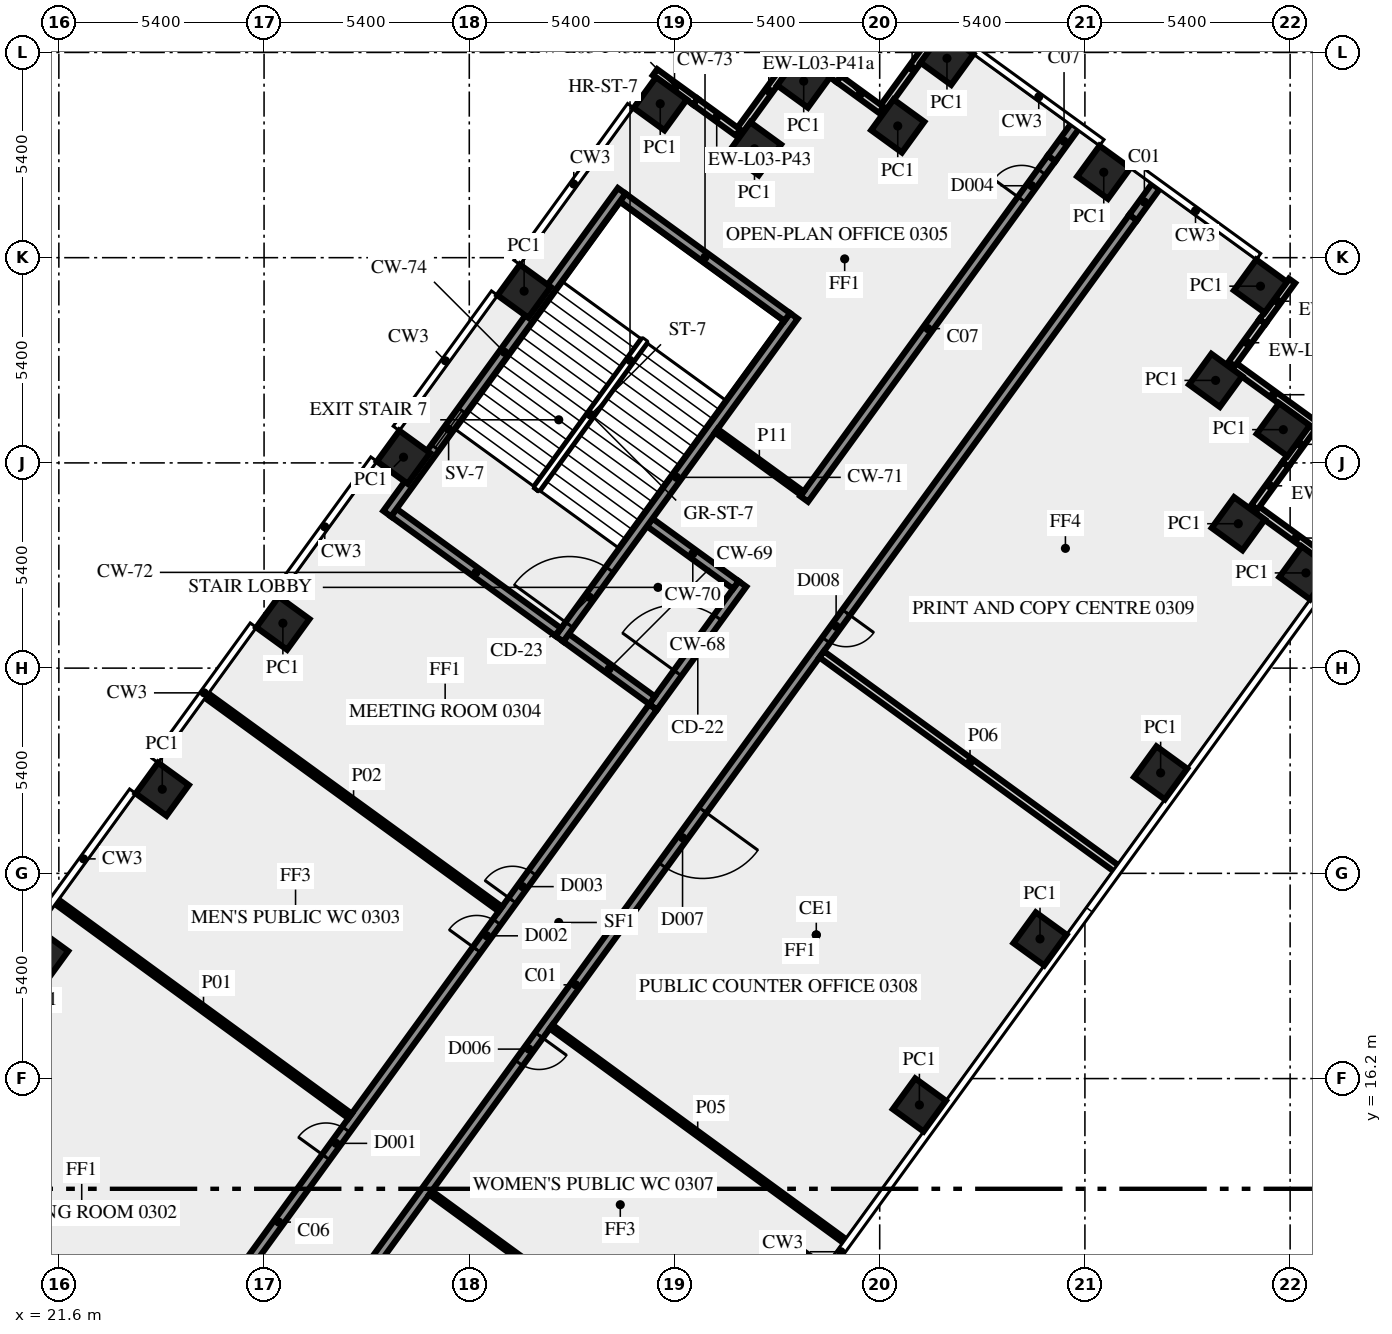
"""IFC4 building model, lengths in metres.
Left out: names, types, materials, properties, quantities, classifications, styles, units other than length and angle.
Written with IfcOpenShell. Run it as: python <this file> out.ifc"""

import sys

from ifc_helpers import new_model, si_unit, direction, frame, frame_2d, origin, origin_2d, place, context, subcontext, project, spatial, rectangle, extrude, element, fill, save


model = new_model("IFC4")
c1 = context("Model", 3, precision=1e-05, world=origin(), true_north=direction((0.0, 1.0)))
c2 = subcontext(c1, "Body", "Model", "MODEL_VIEW")
j1 = project(units=[si_unit("LENGTHUNIT", "METRE"), si_unit("PLANEANGLEUNIT", "RADIAN")], contexts=[c1])
p1 = place(None, origin())
s1 = spatial("IfcSite", under=j1, at=p1, CompositionType="ELEMENT")
p2 = place(p1, origin())
s2 = spatial("IfcBuilding", under=s1, at=p2, CompositionType="ELEMENT")
p3 = place(p2, frame((0.0, 0.0, 16.0)))
s3 = spatial("IfcBuildingStorey", under=s2, at=p3, CompositionType="ELEMENT", Elevation=16.0)
for number, where, z_axis, x_axis in (
    (1, (41.07, 11.137, 0.0), (0.0, 0.0, 1.0), (0.588, 0.809, 0.0)),
    (2, (44.244, 15.506, 0.0), (0.0, 0.0, 1.0), (0.588, 0.809, 0.0)),
    (3, (47.418, 19.875, 0.0), (0.0, 0.0, 1.0), (0.588, 0.809, 0.0)),
    (4, (50.592, 24.243, 0.0), (0.0, 0.0, 1.0), (0.588, 0.809, 0.0)),
    (5, (54.415, 29.505, 0.0), (0.0, 0.0, 1.0), (0.588, 0.809, 0.0)),
    (6, (52.636, 30.8, 0.0), (0.0, 0.0, 1.0), (-0.809, 0.588, 0.0)),
    (7, (53.82, 33.275, 0.0), (0.0, 0.0, 1.0), (-0.809, 0.588, 0.0)),
    (8, (52.039, 34.571, 0.0), (0.0, 0.0, 1.0), (0.588, 0.809, 0.0)),
    (9, (53.22, 37.05, 0.0), (0.0, 0.0, 1.0), (-0.809, 0.588, 0.0)),
    (10, (49.096, 40.047, 0.0), (0.0, 0.0, 1.0), (-0.809, 0.588, 0.0)),
    (11, (44.97, 43.045, 0.0), (0.0, 0.0, 1.0), (-0.809, 0.588, 0.0)),
    (12, (43.675, 41.265, 0.0), (0.0, 0.0, 1.0), (-0.809, 0.588, 0.0)),
    (13, (41.2, 42.445, 0.0), (0.0, 0.0, 1.0), (-0.588, -0.809, 0.0)),
    (14, (39.906, 40.666, 0.0), (0.0, 0.0, 1.0), (-0.588, -0.809, 0.0)),
    (15, (37.425, 41.85, 0.0), (0.0, 0.0, 1.0), (-0.588, -0.809, 0.0)),
    (16, (33.843, 36.919, 0.0), (0.0, 0.0, 1.0), (-0.588, -0.809, 0.0)),
    (17, (30.669, 32.55, 0.0), (0.0, 0.0, 1.0), (-0.588, -0.809, 0.0)),
    (18, (27.495, 28.181, 0.0), (0.0, 0.0, 1.0), (-0.588, -0.809, 0.0)),
    (19, (24.321, 23.812, 0.0), (0.0, 0.0, 1.0), (-0.588, -0.809, 0.0)),
    (20, (21.147, 19.444, 0.0), (0.0, 0.0, 1.0), (-0.588, -0.809, 0.0)),
):
    element("IfcColumn", number, at=place(p3, frame(where, z_axis=z_axis, x_axis=x_axis)), inside=s3, PredefinedType="COLUMN", context=c2, shape_type="SweptSolid", body=[
        extrude(rectangle(XDim=1.0, YDim=1.0, at=origin_2d()), origin(), (0.0, 0.0, 1.0), 4.1),
    ])
p4 = place(p3, frame((55.247, 29.629, 0.0), z_axis=(0.0, 0.0, 1.0), x_axis=(-0.809033161865, 0.587762999008, 0.0)))
e21 = element("IfcWall", 21, at=p4, inside=s3, PredefinedType="SOLIDWALL", context=c2, shape_type="SweptSolid", body=[
    extrude(rectangle(XDim=2.7, YDim=0.2, at=frame_2d((1.35, 0.0))), origin(), (0.0, 0.0, 1.0), 4.1),
])
p5 = place(p3, frame((53.06, 31.233, 0.0), z_axis=(0.0, 0.0, 1.0), x_axis=(0.587776137069, 0.809023616894, 0.0)))
e22 = element("IfcWall", 22, at=p5, inside=s3, PredefinedType="SOLIDWALL", context=c2, shape_type="SweptSolid", body=[
    extrude(rectangle(XDim=1.395, YDim=0.2, at=frame_2d((0.697, 0.0))), origin(), (0.0, 0.0, 1.0), 3.1),
])
p6 = place(p3, frame((53.88, 32.361, 0.0), z_axis=(0.0, 0.0, 1.0), x_axis=(0.587871379726, 0.808954412127, 0.0)))
e23 = element("IfcWall", 23, at=p6, inside=s3, PredefinedType="SOLIDWALL", context=c2, shape_type="SweptSolid", body=[
    extrude(rectangle(XDim=1.305, YDim=0.2, at=frame_2d((0.653, 0.0))), origin(), (0.0, 0.0, 1.0), 4.1),
])
p7 = place(p3, frame((54.65, 33.4, 0.0), z_axis=(0.0, 0.0, 1.0), x_axis=(-0.809033161865, 0.587762999008, 0.0)))
e24 = element("IfcWall", 24, at=p7, inside=s3, PredefinedType="SOLIDWALL", context=c2, shape_type="SweptSolid", body=[
    extrude(rectangle(XDim=2.7, YDim=0.2, at=frame_2d((1.35, 0.0))), origin(), (0.0, 0.0, 1.0), 4.1),
])
p8 = place(p3, frame((52.463, 35.004, 0.0), z_axis=(0.0, 0.0, 1.0), x_axis=(0.587782252522, 0.809019173827, 0.0)))
e25 = element("IfcWall", 25, at=p8, inside=s3, PredefinedType="SOLIDWALL", context=c2, shape_type="SweptSolid", body=[
    extrude(rectangle(XDim=1.379, YDim=0.2, at=frame_2d((0.69, 0.0))), origin(), (0.0, 0.0, 1.0), 3.1),
])
p9 = place(p3, frame((53.273, 36.12, 0.0), z_axis=(0.0, 0.0, 1.0), x_axis=(0.58786388341, 0.808959859686, 0.0)))
e26 = element("IfcWall", 26, at=p9, inside=s3, PredefinedType="SOLIDWALL", context=c2, shape_type="SweptSolid", body=[
    extrude(rectangle(XDim=1.321, YDim=0.2, at=frame_2d((0.66, 0.0))), origin(), (0.0, 0.0, 1.0), 4.1),
])
p10 = place(p3, frame((44.846, 43.875, 0.0), z_axis=(0.0, 0.0, 1.0), x_axis=(-0.587822180636, -0.808990163075, 0.0)))
e27 = element("IfcWall", 27, at=p10, inside=s3, PredefinedType="SOLIDWALL", context=c2, shape_type="SweptSolid", body=[
    extrude(rectangle(XDim=2.7, YDim=0.2, at=frame_2d((1.35, 0.0))), origin(), (0.0, 0.0, 1.0), 4.1),
])
p11 = place(p3, frame((43.242, 41.688, 0.0), z_axis=(0.0, 0.0, 1.0), x_axis=(-0.808926734208, 0.5879094647, 0.0)))
e28 = element("IfcWall", 28, at=p11, inside=s3, PredefinedType="SOLIDWALL", context=c2, shape_type="SweptSolid", body=[
    extrude(rectangle(XDim=1.384, YDim=0.2, at=frame_2d((0.692, 0.0))), origin(), (0.0, 0.0, 1.0), 3.1),
])
p12 = place(p3, frame((42.123, 42.502, 0.0), z_axis=(0.0, 0.0, 1.0), x_axis=(-0.809056865039, 0.587730371117, 0.0)))
e29 = element("IfcWall", 29, at=p12, inside=s3, PredefinedType="SOLIDWALL", context=c2, shape_type="SweptSolid", body=[
    extrude(rectangle(XDim=1.316, YDim=0.2, at=frame_2d((0.658, 0.0))), origin(), (0.0, 0.0, 1.0), 4.1),
])
p13 = place(p3, frame((41.075, 43.278, 0.0), z_axis=(0.0, 0.0, 1.0), x_axis=(-0.587806000234, -0.809001919707, 0.0)))
e30 = element("IfcWall", 30, at=p13, inside=s3, PredefinedType="SOLIDWALL", context=c2, shape_type="SweptSolid", body=[
    extrude(rectangle(XDim=2.7, YDim=0.2, at=frame_2d((1.35, 0.0))), origin(), (0.0, 0.0, 1.0), 4.1),
])
p14 = place(p3, frame((39.471, 41.091, 0.0), z_axis=(0.0, 0.0, 1.0), x_axis=(-0.809002762913, 0.58780483972, 0.0)))
e31 = element("IfcWall", 31, at=p14, inside=s3, PredefinedType="SOLIDWALL", context=c2, shape_type="SweptSolid", body=[
    extrude(rectangle(XDim=1.385, YDim=0.2, at=frame_2d((0.693, 0.0))), origin(), (0.0, 0.0, 1.0), 3.1),
])
p15 = place(p3, frame((38.351, 41.905, 0.0), z_axis=(0.0, 0.0, 1.0), x_axis=(-0.809065186597, 0.587718915671, 0.0)))
e32 = element("IfcWall", 32, at=p15, inside=s3, PredefinedType="SOLIDWALL", context=c2, shape_type="SweptSolid", body=[
    extrude(rectangle(XDim=1.315, YDim=0.2, at=frame_2d((0.657, 0.0))), origin(), (0.0, 0.0, 1.0), 4.1),
])
p16 = place(p3, frame((37.238, 25.98, 0.0), z_axis=(0.0, 0.0, 1.0), x_axis=(0.587772420479, 0.809026317077, 0.0)))
e33 = element("IfcWall", 33, at=p16, inside=s3, PredefinedType="SHEAR", context=c2, shape_type="SweptSolid", body=[
    extrude(rectangle(XDim=4.0, YDim=0.25, at=frame_2d((2.0, 0.0))), origin(), (0.0, 0.0, 1.0), 4.1),
])
p17 = place(p16, frame((1.1, 0.0, 0.0)))
e34 = element("IfcOpeningElement", 34, at=p17, cuts=e33, PredefinedType="OPENING", context=c2, shape_type="SweptSolid", body=[
    extrude(rectangle(XDim=1.8, YDim=2.1, at=frame_2d((0.9, 1.05))), frame((0.0, 0.135, 0.0), z_axis=(0.0, -1.0, 0.0), x_axis=(1.0, 0.0, 0.0)), (0.0, 0.0, 1.0), 0.27),
])
for number, where, z_axis, x_axis in (
    (35, (37.21, 26.154, 0.0), (0.0, 0.0, 1.0), (-0.809, 0.588, 0.0)),
    (36, (39.414, 29.188, 0.0), (0.0, 0.0, 1.0), (-0.809, 0.588, 0.0)),
):
    element("IfcWall", number, at=place(p3, frame(where, z_axis=z_axis, x_axis=x_axis)), inside=s3, PredefinedType="SHEAR", context=c2, shape_type="SweptSolid", body=[
        extrude(rectangle(XDim=2.8, YDim=0.25, at=frame_2d((1.4, 0.0))), origin(), (0.0, 0.0, 1.0), 4.1),
    ])
p18 = place(p3, frame((34.77, 27.772, 0.0), z_axis=(0.0, 0.0, 1.0), x_axis=(0.587795589702, 0.809009483706, 0.0)))
e37 = element("IfcWall", 37, at=p18, inside=s3, PredefinedType="SHEAR", context=c2, shape_type="SweptSolid", body=[
    extrude(rectangle(XDim=10.5, YDim=0.25, at=frame_2d((5.25, 0.0))), origin(), (0.0, 0.0, 1.0), 4.1),
])
p19 = place(p18, frame((0.45, 0.0, 0.0)))
e38 = element("IfcOpeningElement", 38, at=p19, cuts=e37, PredefinedType="OPENING", context=c2, shape_type="SweptSolid", body=[
    extrude(rectangle(XDim=1.8, YDim=2.1, at=frame_2d((0.9, 1.05))), frame((0.0, 0.135, 0.0), z_axis=(0.0, -1.0, 0.0), x_axis=(1.0, 0.0, 0.0)), (0.0, 0.0, 1.0), 0.27),
])
p20 = place(p3, frame((34.742, 27.947, 0.0), z_axis=(0.0, 0.0, 1.0), x_axis=(-0.8089984606, 0.587810760999, 0.0)))
e39 = element("IfcWall", 39, at=p20, inside=s3, PredefinedType="SHEAR", context=c2, shape_type="SweptSolid", body=[
    extrude(rectangle(XDim=5.35, YDim=0.25, at=frame_2d((2.675, 0.0))), origin(), (0.0, 0.0, 1.0), 4.1),
])
p21 = place(p3, frame((40.767, 36.24, 0.0), z_axis=(0.0, 0.0, 1.0), x_axis=(-0.809020161303, 0.587780893365, 0.0)))
e40 = element("IfcWall", 40, at=p21, inside=s3, PredefinedType="SHEAR", context=c2, shape_type="SweptSolid", body=[
    extrude(rectangle(XDim=5.35, YDim=0.25, at=frame_2d((2.675, 0.0))), origin(), (0.0, 0.0, 1.0), 4.1),
])
p22 = place(p3, frame((30.24, 31.064, 0.0), z_axis=(0.0, 0.0, 1.0), x_axis=(0.587795589702, 0.809009483706, 0.0)))
e41 = element("IfcWall", 41, at=p22, inside=s3, PredefinedType="SHEAR", context=c2, shape_type="SweptSolid", body=[
    extrude(rectangle(XDim=10.5, YDim=0.25, at=frame_2d((5.25, 0.0))), origin(), (0.0, 0.0, 1.0), 4.1),
])
p23 = place(p22, frame((2.15, 0.0, 1.0)))
e42 = element("IfcOpeningElement", 42, at=p23, cuts=e41, PredefinedType="OPENING", context=c2, shape_type="SweptSolid", body=[
    extrude(rectangle(XDim=1.2, YDim=1.2, at=frame_2d((0.6, 0.6))), frame((0.0, 0.135, 0.0), z_axis=(0.0, -1.0, 0.0), x_axis=(1.0, 0.0, 0.0)), (0.0, 0.0, 1.0), 0.27),
])
p24 = place(p3, frame((49.869, 38.856, 0.0), z_axis=(0.0, 0.0, 1.0), x_axis=(-0.587784522481, -0.809017524614, 0.0)))
e43 = element("IfcWall", 43, at=p24, inside=s3, PredefinedType="SOLIDWALL", context=c2, shape_type="SweptSolid", body=[
    extrude(rectangle(XDim=49.912, YDim=0.25, at=frame_2d((24.956, 0.0))), origin(), (0.0, 0.0, 1.0), 4.1),
])
p25 = place(p24, frame((19.271, 0.0, 0.0)))
e44 = element("IfcOpeningElement", 44, at=p25, cuts=e43, PredefinedType="OPENING", context=c2, shape_type="SweptSolid", body=[
    extrude(rectangle(XDim=1.8, YDim=2.1, at=frame_2d((0.9, 1.05))), frame((0.0, 0.135, 0.0), z_axis=(0.0, -1.0, 0.0), x_axis=(1.0, 0.0, 0.0)), (0.0, 0.0, 1.0), 0.27),
])
p26 = place(p24, frame((26.596, 0.0, 0.0)))
e45 = element("IfcOpeningElement", 45, at=p26, cuts=e43, PredefinedType="OPENING", context=c2, shape_type="SweptSolid", body=[
    extrude(rectangle(XDim=0.9, YDim=2.1, at=frame_2d((0.45, 1.05))), frame((0.0, 0.135, 0.0), z_axis=(0.0, -1.0, 0.0), x_axis=(1.0, 0.0, 0.0)), (0.0, 0.0, 1.0), 0.27),
])
p27 = place(p24, frame((12.846, 0.0, 0.0)))
e46 = element("IfcOpeningElement", 46, at=p27, cuts=e43, PredefinedType="OPENING", context=c2, shape_type="SweptSolid", body=[
    extrude(rectangle(XDim=0.9, YDim=2.1, at=frame_2d((0.45, 1.05))), frame((0.0, 0.135, 0.0), z_axis=(0.0, -1.0, 0.0), x_axis=(1.0, 0.0, 0.0)), (0.0, 0.0, 1.0), 0.27),
])
p28 = place(p24, frame((39.788, 0.0, 0.0)))
e47 = element("IfcOpeningElement", 47, at=p28, cuts=e43, PredefinedType="OPENING", context=c2, shape_type="SweptSolid", body=[
    extrude(rectangle(XDim=1.8, YDim=2.1, at=frame_2d((0.9, 1.05))), frame((0.0, 0.135, 0.0), z_axis=(0.0, -1.0, 0.0), x_axis=(1.0, 0.0, 0.0)), (0.0, 0.0, 1.0), 0.27),
])
p29 = place(p3, frame((17.545, -1.125, 0.0), z_axis=(0.0, 0.0, 1.0), x_axis=(0.587786323093, 0.809016216391, 0.0)))
e48 = element("IfcWall", 48, at=p29, inside=s3, PredefinedType="SOLIDWALL", context=c2, shape_type="SweptSolid", body=[
    extrude(rectangle(XDim=33.493, YDim=0.25, at=frame_2d((16.747, 0.0))), origin(), (0.0, 0.0, 1.0), 4.1),
])
p30 = place(p29, frame((25.608, 0.0, 0.0)))
e49 = element("IfcOpeningElement", 49, at=p30, cuts=e48, PredefinedType="OPENING", context=c2, shape_type="SweptSolid", body=[
    extrude(rectangle(XDim=0.9, YDim=2.1, at=frame_2d((0.45, 1.05))), frame((0.0, 0.135, 0.0), z_axis=(0.0, -1.0, 0.0), x_axis=(1.0, 0.0, 0.0)), (0.0, 0.0, 1.0), 0.27),
])
p31 = place(p29, frame((18.858, 0.0, 0.0)))
e50 = element("IfcOpeningElement", 50, at=p31, cuts=e48, PredefinedType="OPENING", context=c2, shape_type="SweptSolid", body=[
    extrude(rectangle(XDim=0.9, YDim=2.1, at=frame_2d((0.45, 1.05))), frame((0.0, 0.135, 0.0), z_axis=(0.0, -1.0, 0.0), x_axis=(1.0, 0.0, 0.0)), (0.0, 0.0, 1.0), 0.27),
])
p32 = place(p29, frame((27.208, 0.0, 0.0)))
e51 = element("IfcOpeningElement", 51, at=p32, cuts=e48, PredefinedType="OPENING", context=c2, shape_type="SweptSolid", body=[
    extrude(rectangle(XDim=0.9, YDim=2.1, at=frame_2d((0.45, 1.05))), frame((0.0, 0.135, 0.0), z_axis=(0.0, -1.0, 0.0), x_axis=(1.0, 0.0, 0.0)), (0.0, 0.0, 1.0), 0.27),
])
p33 = place(p3, frame((41.213, 31.451, 0.0), z_axis=(0.0, 0.0, 1.0), x_axis=(0.587773291021, 0.809025684612, 0.0)))
e52 = element("IfcWall", 52, at=p33, inside=s3, PredefinedType="SOLIDWALL", context=c2, shape_type="SweptSolid", body=[
    extrude(rectangle(XDim=11.079, YDim=0.25, at=frame_2d((5.539, 0.0))), origin(), (0.0, 0.0, 1.0), 4.1),
])
p34 = place(p33, frame((9.736, 0.0, 0.0)))
e53 = element("IfcOpeningElement", 53, at=p34, cuts=e52, PredefinedType="OPENING", context=c2, shape_type="SweptSolid", body=[
    extrude(rectangle(XDim=0.9, YDim=2.1, at=frame_2d((0.45, 1.05))), frame((0.0, 0.135, 0.0), z_axis=(0.0, -1.0, 0.0), x_axis=(1.0, 0.0, 0.0)), (0.0, 0.0, 1.0), 0.27),
])
p35 = place(p3, frame((21.55, 20.848, 0.0), z_axis=(0.0, 0.0, 1.0), x_axis=(0.807606997933, -0.589721067023, 0.0)))
e54 = element("IfcWall", 54, at=p35, inside=s3, PredefinedType="PARTITIONING", context=c2, shape_type="SweptSolid", body=[
    extrude(rectangle(XDim=9.55, YDim=0.15, at=frame_2d((4.775, 0.0))), origin(), (0.0, 0.0, 1.0), 3.1),
])
p36 = place(p3, frame((33.218, 20.661, 0.0), z_axis=(0.0, 0.0, 1.0), x_axis=(-0.808989175209, 0.587823540184, 0.0)))
e55 = element("IfcWall", 55, at=p36, inside=s3, PredefinedType="PARTITIONING", context=c2, shape_type="SweptSolid", body=[
    extrude(rectangle(XDim=9.55, YDim=0.15, at=frame_2d((4.775, 0.0))), origin(), (0.0, 0.0, 1.0), 3.1),
])
p37 = place(p3, frame((34.554, 17.565, 0.0), z_axis=(0.0, 0.0, 1.0), x_axis=(0.807645841498, -0.589667868135, 0.0)))
e56 = element("IfcWall", 56, at=p37, inside=s3, PredefinedType="PARTITIONING", context=c2, shape_type="SweptSolid", body=[
    extrude(rectangle(XDim=9.551, YDim=0.12, at=frame_2d((4.775, 0.0))), origin(), (0.0, 0.0, 1.0), 3.1),
])
p38 = place(p3, frame((49.48, 21.69, 0.0), z_axis=(0.0, 0.0, 1.0), x_axis=(-0.808999631097, 0.587809150052, 0.0)))
e57 = element("IfcWall", 57, at=p38, inside=s3, PredefinedType="SOLIDWALL", context=c2, shape_type="SweptSolid", body=[
    extrude(rectangle(XDim=9.651, YDim=0.2, at=frame_2d((4.826, 0.0))), origin(), (0.0, 0.0, 1.0), 3.1),
])
p39 = place(p3, frame((31.38, 13.196, 0.0), z_axis=(0.0, 0.0, 1.0), x_axis=(0.807701085448, -0.589592195137, 0.0)))
e58 = element("IfcWall", 58, at=p39, inside=s3, PredefinedType="PARTITIONING", context=c2, shape_type="SweptSolid", body=[
    extrude(rectangle(XDim=9.651, YDim=0.12, at=frame_2d((4.826, 0.0))), origin(), (0.0, 0.0, 1.0), 3.1),
])
p40 = place(p3, frame((38.9, 33.245, 0.0), z_axis=(0.0, 0.0, 1.0), x_axis=(0.809090262332, -0.587684394381, 0.0)))
e59 = element("IfcWall", 59, at=p40, inside=s3, PredefinedType="PARTITIONING", context=c2, shape_type="SweptSolid", body=[
    extrude(rectangle(XDim=2.801, YDim=0.12, at=frame_2d((1.4, 0.0))), origin(), (0.0, 0.0, 1.0), 4.1),
])
p41 = place(p3, frame((49.869, 38.856, 0.0), z_axis=(0.0, 0.0, 1.0), x_axis=(0.587725246084, 0.809060588037, 0.0)))
e60 = element("IfcWall", 60, at=p41, inside=s3, PredefinedType="SOLIDWALL", context=c2, shape_type="SweptSolid", body=[
    extrude(rectangle(XDim=1.008, YDim=0.25, at=frame_2d((0.504, 0.0))), origin(), (0.0, 0.0, 1.0), 3.1),
])
p42 = place(p3, frame((47.725, 40.414, 0.0), z_axis=(0.0, 0.0, 1.0), x_axis=(0.587883639643, 0.808945502639, 0.0)))
e61 = element("IfcWall", 61, at=p42, inside=s3, PredefinedType="SOLIDWALL", context=c2, shape_type="SweptSolid", body=[
    extrude(rectangle(XDim=1.109, YDim=0.25, at=frame_2d((0.554, 0.0))), origin(), (0.0, 0.0, 1.0), 3.1),
])
p43 = place(p17, origin())
e62 = element("IfcDoor", 62, at=p43, inside=s3, OperationType="DOUBLE_DOOR_SINGLE_SWING", PredefinedType="DOOR", context=c2, shape_type="SweptSolid", body=[
    extrude(rectangle(XDim=1.8, YDim=2.1, at=frame_2d((0.9, 1.05))), frame((0.0, 0.025, 0.0), z_axis=(0.0, -1.0, 0.0), x_axis=(1.0, 0.0, 0.0)), (0.0, 0.0, 1.0), 0.05),
])
fill(e34, e62)
p44 = place(p19, origin())
e63 = element("IfcDoor", 63, at=p44, inside=s3, OperationType="DOUBLE_DOOR_SINGLE_SWING", PredefinedType="DOOR", context=c2, shape_type="SweptSolid", body=[
    extrude(rectangle(XDim=1.8, YDim=2.1, at=frame_2d((0.9, 1.05))), frame((0.0, 0.025, 0.0), z_axis=(0.0, -1.0, 0.0), x_axis=(1.0, 0.0, 0.0)), (0.0, 0.0, 1.0), 0.05),
])
fill(e38, e63)
p45 = place(p23, origin())
e64 = element("IfcWindow", 64, at=p45, inside=s3, PartitioningType="SINGLE_PANEL", PredefinedType="WINDOW", context=c2, shape_type="SweptSolid", body=[
    extrude(rectangle(XDim=1.2, YDim=1.2, at=frame_2d((0.6, 0.6))), frame((0.0, 0.03, 0.0), z_axis=(0.0, -1.0, 0.0), x_axis=(1.0, 0.0, 0.0)), (0.0, 0.0, 1.0), 0.06),
])
fill(e42, e64)
p46 = place(p30, origin())
e65 = element("IfcDoor", 65, at=p46, inside=s3, OperationType="SINGLE_SWING_RIGHT", PredefinedType="DOOR", context=c2, shape_type="SweptSolid", body=[
    extrude(rectangle(XDim=0.9, YDim=2.1, at=frame_2d((0.45, 1.05))), frame((0.0, 0.025, 0.0), z_axis=(0.0, -1.0, 0.0), x_axis=(1.0, 0.0, 0.0)), (0.0, 0.0, 1.0), 0.05),
])
fill(e49, e65)
p47 = place(p34, origin())
e66 = element("IfcDoor", 66, at=p47, inside=s3, OperationType="SINGLE_SWING_RIGHT", PredefinedType="DOOR", context=c2, shape_type="SweptSolid", body=[
    extrude(rectangle(XDim=0.9, YDim=2.1, at=frame_2d((0.45, 1.05))), frame((0.0, 0.025, 0.0), z_axis=(0.0, -1.0, 0.0), x_axis=(1.0, 0.0, 0.0)), (0.0, 0.0, 1.0), 0.05),
])
fill(e53, e66)
p48 = place(p25, origin())
e67 = element("IfcDoor", 67, at=p48, inside=s3, OperationType="DOUBLE_DOOR_SINGLE_SWING", PredefinedType="DOOR", context=c2, shape_type="SweptSolid", body=[
    extrude(rectangle(XDim=1.8, YDim=2.1, at=frame_2d((0.9, 1.05))), frame((0.0, 0.025, 0.0), z_axis=(0.0, -1.0, 0.0), x_axis=(1.0, 0.0, 0.0)), (0.0, 0.0, 1.0), 0.05),
])
fill(e44, e67)
p49 = place(p26, origin())
e68 = element("IfcDoor", 68, at=p49, inside=s3, OperationType="SINGLE_SWING_LEFT", PredefinedType="DOOR", context=c2, shape_type="SweptSolid", body=[
    extrude(rectangle(XDim=0.9, YDim=2.1, at=frame_2d((0.45, 1.05))), frame((0.0, 0.025, 0.0), z_axis=(0.0, -1.0, 0.0), x_axis=(1.0, 0.0, 0.0)), (0.0, 0.0, 1.0), 0.05),
])
fill(e45, e68)
p50 = place(p31, origin())
e69 = element("IfcDoor", 69, at=p50, inside=s3, OperationType="SINGLE_SWING_RIGHT", PredefinedType="DOOR", context=c2, shape_type="SweptSolid", body=[
    extrude(rectangle(XDim=0.9, YDim=2.1, at=frame_2d((0.45, 1.05))), frame((0.0, 0.025, 0.0), z_axis=(0.0, -1.0, 0.0), x_axis=(1.0, 0.0, 0.0)), (0.0, 0.0, 1.0), 0.05),
])
fill(e50, e69)
p51 = place(p32, origin())
e70 = element("IfcDoor", 70, at=p51, inside=s3, OperationType="SINGLE_SWING_LEFT", PredefinedType="DOOR", context=c2, shape_type="SweptSolid", body=[
    extrude(rectangle(XDim=0.9, YDim=2.1, at=frame_2d((0.45, 1.05))), frame((0.0, 0.025, 0.0), z_axis=(0.0, -1.0, 0.0), x_axis=(1.0, 0.0, 0.0)), (0.0, 0.0, 1.0), 0.05),
])
fill(e51, e70)
p52 = place(p27, origin())
e71 = element("IfcDoor", 71, at=p52, inside=s3, OperationType="SINGLE_SWING_RIGHT", PredefinedType="DOOR", context=c2, shape_type="SweptSolid", body=[
    extrude(rectangle(XDim=0.9, YDim=2.1, at=frame_2d((0.45, 1.05))), frame((0.0, 0.025, 0.0), z_axis=(0.0, -1.0, 0.0), x_axis=(1.0, 0.0, 0.0)), (0.0, 0.0, 1.0), 0.05),
])
fill(e46, e71)
save(model, sys.argv[1])
